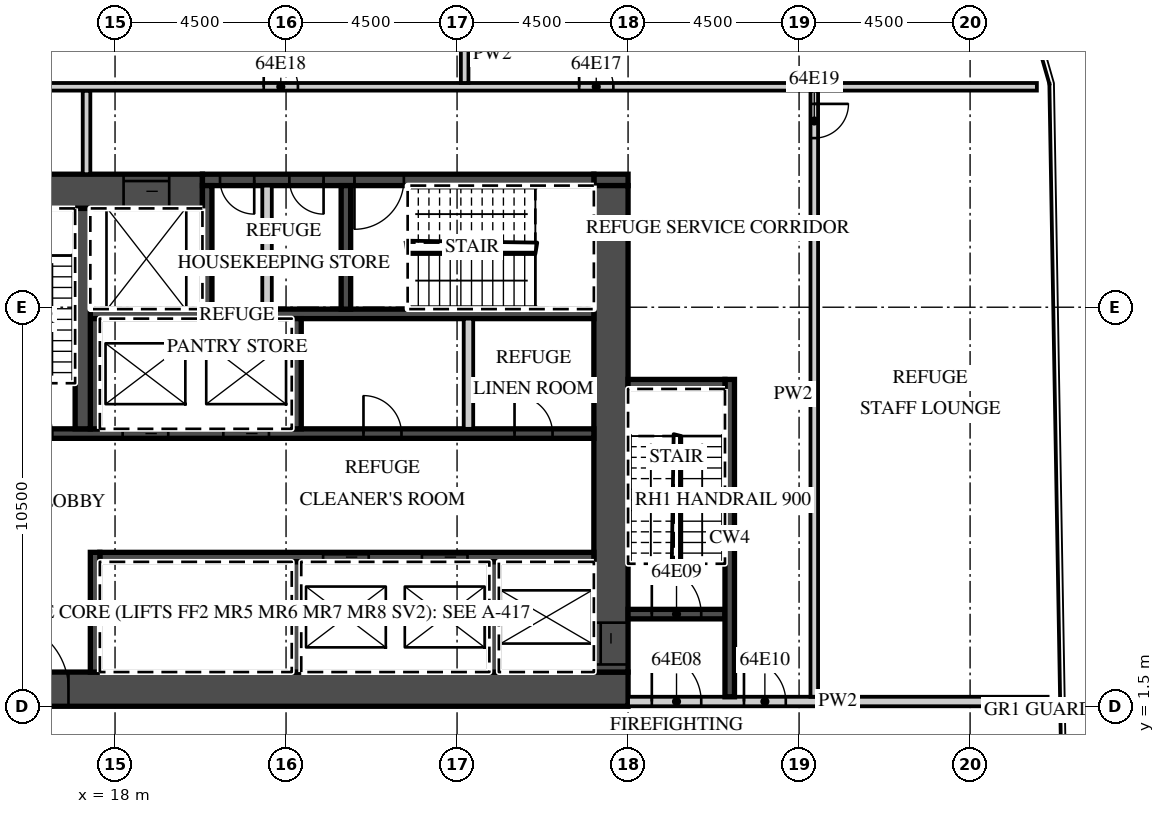
"""IFC4 building model, lengths in metres.
Left out: names, types, materials, properties, quantities, classifications, styles, units other than length and angle.
Written with IfcOpenShell. Run it as: python <this file> out.ifc"""

import sys

from ifc_helpers import new_model, si_unit, direction, frame, frame_2d, origin, place, context, subcontext, project, spatial, rectangle, extrude, element, fill, save


model = new_model("IFC4")
c1 = context("Model", 3, precision=1e-05, world=origin(), true_north=direction((0.0, 1.0)))
c2 = subcontext(c1, "Body", "Model", "MODEL_VIEW")
j1 = project(units=[si_unit("LENGTHUNIT", "METRE"), si_unit("PLANEANGLEUNIT", "RADIAN")], contexts=[c1])
p1 = place(None, origin())
s1 = spatial("IfcSite", under=j1, at=p1, CompositionType="ELEMENT")
p2 = place(p1, origin())
s2 = spatial("IfcBuilding", under=s1, at=p2, CompositionType="ELEMENT")
p3 = place(p2, frame((0.0, 0.0, 257.3)))
s3 = spatial("IfcBuildingStorey", under=s2, at=p3, CompositionType="ELEMENT", Elevation=257.3)
p4 = place(p3, frame((13.5, 1.95, 0.0), z_axis=(0.0, 0.0, 1.0), x_axis=(1.0, 0.0, 0.0)))
e1 = element("IfcWall", 1, at=p4, inside=s3, PredefinedType="SHEAR", context=c2, shape_type="SweptSolid", body=[
    extrude(rectangle(XDim=18.0, YDim=0.9, at=frame_2d((9.0, 0.0))), origin(), (0.0, 0.0, 1.0), 4.2),
])
p5 = place(p4, frame((1.475, 0.0, 0.0)))
e2 = element("IfcOpeningElement", 2, at=p5, cuts=e1, PredefinedType="OPENING", context=c2, shape_type="SweptSolid", body=[
    extrude(rectangle(XDim=1.8, YDim=2.1, at=frame_2d((0.9, 1.05))), frame((0.0, 0.46, 0.0), z_axis=(0.0, -1.0, 0.0), x_axis=(1.0, 0.0, 0.0)), (0.0, 0.0, 1.0), 0.92),
])
p6 = place(p3, frame((13.5, 15.05, 0.0), z_axis=(0.0, 0.0, 1.0), x_axis=(1.0, 0.0, 0.0)))
e3 = element("IfcWall", 3, at=p6, inside=s3, PredefinedType="SHEAR", context=c2, shape_type="SweptSolid", body=[
    extrude(rectangle(XDim=6.8, YDim=0.9, at=frame_2d((3.4, 0.0))), origin(), (0.0, 0.0, 1.0), 4.2),
])
p7 = place(p6, frame((4.725, 0.0, 0.0)))
e4 = element("IfcOpeningElement", 4, at=p7, cuts=e3, PredefinedType="OPENING", context=c2, shape_type="SweptSolid", body=[
    extrude(rectangle(XDim=1.2, YDim=2.1, at=frame_2d((0.6, 1.05))), frame((0.0, 0.46, 0.0), z_axis=(0.0, -1.0, 0.0), x_axis=(1.0, 0.0, 0.0)), (0.0, 0.0, 1.0), 0.92),
])
p8 = place(p3, frame((30.6, 15.35, 0.0), z_axis=(0.0, 0.0, 1.0), x_axis=(1.0, 0.0, 0.0)))
e5 = element("IfcWall", 5, at=p8, inside=s3, PredefinedType="SHEAR", context=c2, shape_type="SweptSolid", body=[
    extrude(rectangle(XDim=0.9, YDim=0.3, at=frame_2d((0.45, 0.0))), origin(), (0.0, 0.0, 1.0), 4.2),
])
p9 = place(p3, frame((20.3, 15.35, 0.0), z_axis=(0.0, 0.0, 1.0), x_axis=(1.0, 0.0, 0.0)))
e6 = element("IfcWall", 6, at=p9, inside=s3, PredefinedType="SHEAR", context=c2, shape_type="SweptSolid", body=[
    extrude(rectangle(XDim=10.3, YDim=0.3, at=frame_2d((5.15, 0.0))), origin(), (0.0, 0.0, 1.0), 4.2),
])
p10 = place(p9, frame((4.0, 0.0, 0.0)))
e7 = element("IfcOpeningElement", 7, at=p10, cuts=e6, PredefinedType="OPENING", context=c2, shape_type="SweptSolid", body=[
    extrude(rectangle(XDim=1.3, YDim=2.1, at=frame_2d((0.65, 1.05))), frame((0.0, 0.16, 0.0), z_axis=(0.0, -1.0, 0.0), x_axis=(1.0, 0.0, 0.0)), (0.0, 0.0, 1.0), 0.32),
])
p11 = place(p9, frame((2.288, 0.0, 0.0)))
e8 = element("IfcOpeningElement", 8, at=p11, cuts=e6, PredefinedType="OPENING", context=c2, shape_type="SweptSolid", body=[
    extrude(rectangle(XDim=0.9, YDim=2.1, at=frame_2d((0.45, 1.05))), frame((0.0, 0.16, 0.0), z_axis=(0.0, -1.0, 0.0), x_axis=(1.0, 0.0, 0.0)), (0.0, 0.0, 1.0), 0.32),
])
p12 = place(p9, frame((0.462, 0.0, 0.0)))
e9 = element("IfcOpeningElement", 9, at=p12, cuts=e6, PredefinedType="OPENING", context=c2, shape_type="SweptSolid", body=[
    extrude(rectangle(XDim=0.9, YDim=2.1, at=frame_2d((0.45, 1.05))), frame((0.0, 0.16, 0.0), z_axis=(0.0, -1.0, 0.0), x_axis=(1.0, 0.0, 0.0)), (0.0, 0.0, 1.0), 0.32),
])
p13 = place(p3, frame((31.05, 2.4, 0.0), z_axis=(0.0, 0.0, 1.0), x_axis=(0.0, 1.0, 0.0)))
e10 = element("IfcWall", 10, at=p13, inside=s3, PredefinedType="SHEAR", context=c2, shape_type="SweptSolid", body=[
    extrude(rectangle(XDim=12.8, YDim=0.9, at=frame_2d((6.4, 0.0))), origin(), (0.0, 0.0, 1.0), 4.2),
])
p14 = place(p13, frame((0.2, 0.0, 0.0)))
e11 = element("IfcOpeningElement", 11, at=p14, cuts=e10, PredefinedType="OPENING", context=c2, shape_type="SweptSolid", body=[
    extrude(rectangle(XDim=1.1, YDim=2.1, at=frame_2d((0.55, 1.05))), frame((0.0, 0.46, 0.0), z_axis=(0.0, -1.0, 0.0), x_axis=(1.0, 0.0, 0.0)), (0.0, 0.0, 1.0), 0.92),
])
p15 = place(p3, frame((17.6, 5.425, 0.0), z_axis=(0.0, 0.0, 1.0), x_axis=(1.0, 0.0, 0.0)))
e12 = element("IfcWall", 12, at=p15, inside=s3, PredefinedType="SHEAR", context=c2, shape_type="SweptSolid", body=[
    extrude(rectangle(XDim=13.0, YDim=0.25, at=frame_2d((6.5, 0.0))), origin(), (0.0, 0.0, 1.0), 4.2),
])
p16 = place(p15, frame((8.475, 0.0, 0.0)))
e13 = element("IfcOpeningElement", 13, at=p16, cuts=e12, PredefinedType="OPENING", context=c2, shape_type="SweptSolid", body=[
    extrude(rectangle(XDim=1.2, YDim=2.1, at=frame_2d((0.6, 1.05))), frame((0.0, 0.135, 0.0), z_axis=(0.0, -1.0, 0.0), x_axis=(1.0, 0.0, 0.0)), (0.0, 0.0, 1.0), 0.27),
])
p17 = place(p15, frame((5.875, 0.0, 0.0)))
e14 = element("IfcOpeningElement", 14, at=p17, cuts=e12, PredefinedType="OPENING", context=c2, shape_type="SweptSolid", body=[
    extrude(rectangle(XDim=1.2, YDim=2.1, at=frame_2d((0.6, 1.05))), frame((0.0, 0.135, 0.0), z_axis=(0.0, -1.0, 0.0), x_axis=(1.0, 0.0, 0.0)), (0.0, 0.0, 1.0), 0.27),
])
p18 = place(p3, frame((17.475, 2.4, 0.0), z_axis=(0.0, 0.0, 1.0), x_axis=(0.0, 1.0, 0.0)))
e15 = element("IfcWall", 15, at=p18, inside=s3, PredefinedType="SHEAR", context=c2, shape_type="SweptSolid", body=[
    extrude(rectangle(XDim=3.15, YDim=0.25, at=frame_2d((1.575, 0.0))), origin(), (0.0, 0.0, 1.0), 4.2),
])
for number, where, z_axis, x_axis in (
    (16, (27.975, 2.4, 0.0), (0.0, 0.0, 1.0), (0.0, 1.0, 0.0)),
    (17, (22.775, 2.4, 0.0), (0.0, 0.0, 1.0), (0.0, 1.0, 0.0)),
):
    element("IfcWall", number, at=place(p3, frame(where, z_axis=z_axis, x_axis=x_axis)), inside=s3, PredefinedType="SHEAR", context=c2, shape_type="SweptSolid", body=[
        extrude(rectangle(XDim=2.9, YDim=0.25, at=frame_2d((1.45, 0.0))), origin(), (0.0, 0.0, 1.0), 4.2),
    ])
p19 = place(p3, frame((14.4, 8.675, 0.0), z_axis=(0.0, 0.0, 1.0), x_axis=(1.0, 0.0, 0.0)))
e18 = element("IfcWall", 18, at=p19, inside=s3, PredefinedType="SHEAR", context=c2, shape_type="SweptSolid", body=[
    extrude(rectangle(XDim=16.2, YDim=0.25, at=frame_2d((8.1, 0.0))), origin(), (0.0, 0.0, 1.0), 4.2),
])
p20 = place(p19, frame((6.45, 0.0, 0.0)))
e19 = element("IfcOpeningElement", 19, at=p20, cuts=e18, PredefinedType="OPENING", context=c2, shape_type="SweptSolid", body=[
    extrude(rectangle(XDim=1.2, YDim=2.1, at=frame_2d((0.6, 1.05))), frame((0.0, 0.135, 0.0), z_axis=(0.0, -1.0, 0.0), x_axis=(1.0, 0.0, 0.0)), (0.0, 0.0, 1.0), 0.27),
])
p21 = place(p19, frame((3.8, 0.0, 0.0)))
e20 = element("IfcOpeningElement", 20, at=p21, cuts=e18, PredefinedType="OPENING", context=c2, shape_type="SweptSolid", body=[
    extrude(rectangle(XDim=1.2, YDim=2.1, at=frame_2d((0.6, 1.05))), frame((0.0, 0.135, 0.0), z_axis=(0.0, -1.0, 0.0), x_axis=(1.0, 0.0, 0.0)), (0.0, 0.0, 1.0), 0.27),
])
p22 = place(p19, frame((0.65, 0.0, 0.0)))
e21 = element("IfcOpeningElement", 21, at=p22, cuts=e18, PredefinedType="OPENING", context=c2, shape_type="SweptSolid", body=[
    extrude(rectangle(XDim=1.3, YDim=2.1, at=frame_2d((0.65, 1.05))), frame((0.0, 0.135, 0.0), z_axis=(0.0, -1.0, 0.0), x_axis=(1.0, 0.0, 0.0)), (0.0, 0.0, 1.0), 0.27),
])
p23 = place(p19, frame((14.113, 0.0, 0.0)))
e22 = element("IfcOpeningElement", 22, at=p23, cuts=e18, PredefinedType="OPENING", context=c2, shape_type="SweptSolid", body=[
    extrude(rectangle(XDim=1.0, YDim=2.1, at=frame_2d((0.5, 1.05))), frame((0.0, 0.135, 0.0), z_axis=(0.0, -1.0, 0.0), x_axis=(1.0, 0.0, 0.0)), (0.0, 0.0, 1.0), 0.27),
])
p24 = place(p19, frame((10.137, 0.0, 0.0)))
e23 = element("IfcOpeningElement", 23, at=p24, cuts=e18, PredefinedType="OPENING", context=c2, shape_type="SweptSolid", body=[
    extrude(rectangle(XDim=1.0, YDim=2.1, at=frame_2d((0.5, 1.05))), frame((0.0, 0.135, 0.0), z_axis=(0.0, -1.0, 0.0), x_axis=(1.0, 0.0, 0.0)), (0.0, 0.0, 1.0), 0.27),
])
p25 = place(p3, frame((17.35, 11.825, 0.0), z_axis=(0.0, 0.0, 1.0), x_axis=(1.0, 0.0, 0.0)))
e24 = element("IfcWall", 24, at=p25, inside=s3, PredefinedType="SHEAR", context=c2, shape_type="SweptSolid", body=[
    extrude(rectangle(XDim=13.25, YDim=0.25, at=frame_2d((6.625, 0.0))), origin(), (0.0, 0.0, 1.0), 4.2),
])
for number, where, z_axis, x_axis in (
    (25, (17.475, 8.8, 0.0), (0.0, 0.0, 1.0), (0.0, 1.0, 0.0)),
    (26, (22.775, 8.8, 0.0), (0.0, 0.0, 1.0), (0.0, 1.0, 0.0)),
):
    element("IfcWall", number, at=place(p3, frame(where, z_axis=z_axis, x_axis=x_axis)), inside=s3, PredefinedType="SHEAR", context=c2, shape_type="SweptSolid", body=[
        extrude(rectangle(XDim=2.9, YDim=0.25, at=frame_2d((1.45, 0.0))), origin(), (0.0, 0.0, 1.0), 4.2),
    ])
p26 = place(p3, frame((27.3, 8.8, 0.0), z_axis=(0.0, 0.0, 1.0), x_axis=(0.0, 1.0, 0.0)))
e27 = element("IfcWall", 27, at=p26, inside=s3, PredefinedType="PARTITIONING", context=c2, shape_type="SweptSolid", body=[
    extrude(rectangle(XDim=2.9, YDim=0.25, at=frame_2d((1.45, 0.0))), origin(), (0.0, 0.0, 1.0), 4.2),
])
p27 = place(p3, frame((17.15, 8.8, 0.0), z_axis=(0.0, 0.0, 1.0), x_axis=(0.0, 1.0, 0.0)))
e28 = element("IfcWall", 28, at=p27, inside=s3, PredefinedType="SHEAR", context=c2, shape_type="SweptSolid", body=[
    extrude(rectangle(XDim=5.8, YDim=0.4, at=frame_2d((2.9, 0.0))), origin(), (0.0, 0.0, 1.0), 4.2),
])
for number, where, z_axis, x_axis in (
    (29, (20.425, 11.95, 0.0), (0.0, 0.0, 1.0), (0.0, 1.0, 0.0)),
    (30, (24.075, 11.95, 0.0), (0.0, 0.0, 1.0), (0.0, 1.0, 0.0)),
):
    element("IfcWall", number, at=place(p3, frame(where, z_axis=z_axis, x_axis=x_axis)), inside=s3, PredefinedType="SHEAR", context=c2, shape_type="SweptSolid", body=[
        extrude(rectangle(XDim=3.25, YDim=0.25, at=frame_2d((1.625, 0.0))), origin(), (0.0, 0.0, 1.0), 4.2),
    ])
p28 = place(p3, frame((22.0, 11.95, 0.0), z_axis=(0.0, 0.0, 1.0), x_axis=(0.0, 1.0, 0.0)))
e31 = element("IfcWall", 31, at=p28, inside=s3, PredefinedType="PARTITIONING", context=c2, shape_type="SweptSolid", body=[
    extrude(rectangle(XDim=3.25, YDim=0.25, at=frame_2d((1.625, 0.0))), origin(), (0.0, 0.0, 1.0), 4.2),
])
p29 = place(p3, frame((31.5, 1.625, 0.0), z_axis=(0.0, 0.0, 1.0), x_axis=(1.0, 0.0, 0.0)))
e32 = element("IfcWall", 32, at=p29, inside=s3, PredefinedType="PARTITIONING", context=c2, shape_type="SweptSolid", body=[
    extrude(rectangle(XDim=11.04, YDim=0.25, at=frame_2d((5.52, 0.0))), origin(), (0.0, 0.0, 1.0), 4.2),
])
p30 = place(p29, frame((0.625, 0.0, 0.0)))
e33 = element("IfcOpeningElement", 33, at=p30, cuts=e32, PredefinedType="OPENING", context=c2, shape_type="SweptSolid", body=[
    extrude(rectangle(XDim=1.3, YDim=2.1, at=frame_2d((0.65, 1.05))), frame((0.0, 0.135, 0.0), z_axis=(0.0, -1.0, 0.0), x_axis=(1.0, 0.0, 0.0)), (0.0, 0.0, 1.0), 0.27),
])
p31 = place(p29, frame((3.05, 0.0, 0.0)))
e34 = element("IfcOpeningElement", 34, at=p31, cuts=e32, PredefinedType="OPENING", context=c2, shape_type="SweptSolid", body=[
    extrude(rectangle(XDim=1.1, YDim=2.1, at=frame_2d((0.55, 1.05))), frame((0.0, 0.135, 0.0), z_axis=(0.0, -1.0, 0.0), x_axis=(1.0, 0.0, 0.0)), (0.0, 0.0, 1.0), 0.27),
])
p32 = place(p3, frame((31.5, 3.925, 0.0), z_axis=(0.0, 0.0, 1.0), x_axis=(1.0, 0.0, 0.0)))
e35 = element("IfcWall", 35, at=p32, inside=s3, PredefinedType="SHEAR", context=c2, shape_type="SweptSolid", body=[
    extrude(rectangle(XDim=2.55, YDim=0.25, at=frame_2d((1.275, 0.0))), origin(), (0.0, 0.0, 1.0), 4.2),
])
p33 = place(p32, frame((0.625, 0.0, 0.0)))
e36 = element("IfcOpeningElement", 36, at=p33, cuts=e35, PredefinedType="OPENING", context=c2, shape_type="SweptSolid", body=[
    extrude(rectangle(XDim=1.3, YDim=2.1, at=frame_2d((0.65, 1.05))), frame((0.0, 0.135, 0.0), z_axis=(0.0, -1.0, 0.0), x_axis=(1.0, 0.0, 0.0)), (0.0, 0.0, 1.0), 0.27),
])
p34 = place(p3, frame((34.175, 1.75, 0.0), z_axis=(0.0, 0.0, 1.0), x_axis=(0.0, 1.0, 0.0)))
e37 = element("IfcWall", 37, at=p34, inside=s3, PredefinedType="SHEAR", context=c2, shape_type="SweptSolid", body=[
    extrude(rectangle(XDim=8.35, YDim=0.25, at=frame_2d((4.175, 0.0))), origin(), (0.0, 0.0, 1.0), 4.2),
])
p35 = place(p3, frame((31.5, 9.975, 0.0), z_axis=(0.0, 0.0, 1.0), x_axis=(1.0, 0.0, 0.0)))
e38 = element("IfcWall", 38, at=p35, inside=s3, PredefinedType="SHEAR", context=c2, shape_type="SweptSolid", body=[
    extrude(rectangle(XDim=2.55, YDim=0.25, at=frame_2d((1.275, 0.0))), origin(), (0.0, 0.0, 1.0), 4.2),
])
p36 = place(p3, frame((17.25, 15.5, 0.0), z_axis=(0.0, 0.0, 1.0), x_axis=(0.0, 1.0, 0.0)))
e39 = element("IfcWall", 39, at=p36, inside=s3, PredefinedType="PARTITIONING", context=c2, shape_type="SweptSolid", body=[
    extrude(rectangle(XDim=2.2, YDim=0.2, at=frame_2d((1.1, 0.0))), origin(), (0.0, 0.0, 1.0), 4.2),
])
p37 = place(p3, frame((36.4, 1.75, 0.0), z_axis=(0.0, 0.0, 1.0), x_axis=(0.0, 1.0, 0.0)))
e40 = element("IfcWall", 40, at=p37, inside=s3, PredefinedType="PARTITIONING", context=c2, shape_type="SweptSolid", body=[
    extrude(rectangle(XDim=15.95, YDim=0.2, at=frame_2d((7.975, 0.0))), origin(), (0.0, 0.0, 1.0), 4.2),
])
p38 = place(p37, frame((14.7, 0.0, 0.0)))
e41 = element("IfcOpeningElement", 41, at=p38, cuts=e40, PredefinedType="OPENING", context=c2, shape_type="SweptSolid", body=[
    extrude(rectangle(XDim=0.9, YDim=2.1, at=frame_2d((0.45, 1.05))), frame((0.0, 0.11, 0.0), z_axis=(0.0, -1.0, 0.0), x_axis=(1.0, 0.0, 0.0)), (0.0, 0.0, 1.0), 0.22),
])
p39 = place(p3, frame((13.6, 17.8, 0.0), z_axis=(0.0, 0.0, 1.0), x_axis=(1.0, 0.0, 0.0)))
e42 = element("IfcWall", 42, at=p39, inside=s3, PredefinedType="PARTITIONING", context=c2, shape_type="SweptSolid", body=[
    extrude(rectangle(XDim=28.657, YDim=0.2, at=frame_2d((14.329, 0.0))), origin(), (0.0, 0.0, 1.0), 4.2),
])
p40 = place(p39, frame((16.613, 0.0, 0.0)))
e43 = element("IfcOpeningElement", 43, at=p40, cuts=e42, PredefinedType="OPENING", context=c2, shape_type="SweptSolid", body=[
    extrude(rectangle(XDim=0.9, YDim=2.1, at=frame_2d((0.45, 1.05))), frame((0.0, 0.11, 0.0), z_axis=(0.0, -1.0, 0.0), x_axis=(1.0, 0.0, 0.0)), (0.0, 0.0, 1.0), 0.22),
])
p41 = place(p39, frame((8.312, 0.0, 0.0)))
e44 = element("IfcOpeningElement", 44, at=p41, cuts=e42, PredefinedType="OPENING", context=c2, shape_type="SweptSolid", body=[
    extrude(rectangle(XDim=0.9, YDim=2.1, at=frame_2d((0.45, 1.05))), frame((0.0, 0.11, 0.0), z_axis=(0.0, -1.0, 0.0), x_axis=(1.0, 0.0, 0.0)), (0.0, 0.0, 1.0), 0.22),
])
p42 = place(p3, frame((27.2, 17.9, 0.0), z_axis=(0.0, 0.0, 1.0), x_axis=(0.0, 1.0, 0.0)))
e45 = element("IfcWall", 45, at=p42, inside=s3, PredefinedType="PARTITIONING", context=c2, shape_type="SweptSolid", body=[
    extrude(rectangle(XDim=3.276, YDim=0.2, at=frame_2d((1.638, 0.0))), origin(), (0.0, 0.0, 1.0), 4.2),
])
p43 = place(p20, origin())
e46 = element("IfcDoor", 46, at=p43, inside=s3, OperationType="SLIDING_TO_LEFT", PredefinedType="DOOR", context=c2, shape_type="SweptSolid", body=[
    extrude(rectangle(XDim=1.2, YDim=2.1, at=frame_2d((0.6, 1.05))), frame((0.0, 0.025, 0.0), z_axis=(0.0, -1.0, 0.0), x_axis=(1.0, 0.0, 0.0)), (0.0, 0.0, 1.0), 0.05),
])
fill(e19, e46)
p44 = place(p21, origin())
e47 = element("IfcDoor", 47, at=p44, inside=s3, OperationType="SLIDING_TO_RIGHT", PredefinedType="DOOR", context=c2, shape_type="SweptSolid", body=[
    extrude(rectangle(XDim=1.2, YDim=2.1, at=frame_2d((0.6, 1.05))), frame((0.0, 0.025, 0.0), z_axis=(0.0, -1.0, 0.0), x_axis=(1.0, 0.0, 0.0)), (0.0, 0.0, 1.0), 0.05),
])
fill(e20, e47)
p45 = place(p16, origin())
e48 = element("IfcDoor", 48, at=p45, inside=s3, OperationType="SLIDING_TO_LEFT", PredefinedType="DOOR", context=c2, shape_type="SweptSolid", body=[
    extrude(rectangle(XDim=1.2, YDim=2.1, at=frame_2d((0.6, 1.05))), frame((0.0, 0.025, 0.0), z_axis=(0.0, -1.0, 0.0), x_axis=(1.0, 0.0, 0.0)), (0.0, 0.0, 1.0), 0.05),
])
fill(e13, e48)
p46 = place(p17, origin())
e49 = element("IfcDoor", 49, at=p46, inside=s3, OperationType="SLIDING_TO_RIGHT", PredefinedType="DOOR", context=c2, shape_type="SweptSolid", body=[
    extrude(rectangle(XDim=1.2, YDim=2.1, at=frame_2d((0.6, 1.05))), frame((0.0, 0.025, 0.0), z_axis=(0.0, -1.0, 0.0), x_axis=(1.0, 0.0, 0.0)), (0.0, 0.0, 1.0), 0.05),
])
fill(e14, e49)
p47 = place(p7, origin())
e50 = element("IfcDoor", 50, at=p47, inside=s3, OperationType="SLIDING_TO_LEFT", PredefinedType="DOOR", context=c2, shape_type="SweptSolid", body=[
    extrude(rectangle(XDim=1.2, YDim=2.1, at=frame_2d((0.6, 1.05))), frame((0.0, 0.025, 0.0), z_axis=(0.0, -1.0, 0.0), x_axis=(1.0, 0.0, 0.0)), (0.0, 0.0, 1.0), 0.05),
])
fill(e4, e50)
p48 = place(p14, origin())
e51 = element("IfcDoor", 51, at=p48, inside=s3, OperationType="SLIDING_TO_LEFT", PredefinedType="DOOR", context=c2, shape_type="SweptSolid", body=[
    extrude(rectangle(XDim=1.1, YDim=2.1, at=frame_2d((0.55, 1.05))), frame((0.0, 0.025, 0.0), z_axis=(0.0, -1.0, 0.0), x_axis=(1.0, 0.0, 0.0)), (0.0, 0.0, 1.0), 0.05),
])
fill(e11, e51)
p49 = place(p5, origin())
e52 = element("IfcDoor", 52, at=p49, inside=s3, OperationType="DOUBLE_DOOR_DOUBLE_SWING", PredefinedType="DOOR", context=c2, shape_type="SweptSolid", body=[
    extrude(rectangle(XDim=1.8, YDim=2.1, at=frame_2d((0.9, 1.05))), frame((0.0, 0.025, 0.0), z_axis=(0.0, -1.0, 0.0), x_axis=(1.0, 0.0, 0.0)), (0.0, 0.0, 1.0), 0.05),
])
fill(e2, e52)
p50 = place(p30, origin())
e53 = element("IfcDoor", 53, at=p50, inside=s3, OperationType="SINGLE_SWING_LEFT", PredefinedType="DOOR", context=c2, shape_type="SweptSolid", body=[
    extrude(rectangle(XDim=1.3, YDim=2.1, at=frame_2d((0.65, 1.05))), frame((0.0, 0.025, 0.0), z_axis=(0.0, -1.0, 0.0), x_axis=(1.0, 0.0, 0.0)), (0.0, 0.0, 1.0), 0.05),
])
fill(e33, e53)
p51 = place(p33, origin())
e54 = element("IfcDoor", 54, at=p51, inside=s3, OperationType="SINGLE_SWING_LEFT", PredefinedType="DOOR", context=c2, shape_type="SweptSolid", body=[
    extrude(rectangle(XDim=1.3, YDim=2.1, at=frame_2d((0.65, 1.05))), frame((0.0, 0.025, 0.0), z_axis=(0.0, -1.0, 0.0), x_axis=(1.0, 0.0, 0.0)), (0.0, 0.0, 1.0), 0.05),
])
fill(e36, e54)
p52 = place(p31, origin())
e55 = element("IfcDoor", 55, at=p52, inside=s3, OperationType="SINGLE_SWING_LEFT", PredefinedType="DOOR", context=c2, shape_type="SweptSolid", body=[
    extrude(rectangle(XDim=1.1, YDim=2.1, at=frame_2d((0.55, 1.05))), frame((0.0, 0.025, 0.0), z_axis=(0.0, -1.0, 0.0), x_axis=(1.0, 0.0, 0.0)), (0.0, 0.0, 1.0), 0.05),
])
fill(e34, e55)
p53 = place(p10, origin())
e56 = element("IfcDoor", 56, at=p53, inside=s3, OperationType="SINGLE_SWING_LEFT", PredefinedType="DOOR", context=c2, shape_type="SweptSolid", body=[
    extrude(rectangle(XDim=1.3, YDim=2.1, at=frame_2d((0.65, 1.05))), frame((0.0, 0.025, 0.0), z_axis=(0.0, -1.0, 0.0), x_axis=(1.0, 0.0, 0.0)), (0.0, 0.0, 1.0), 0.05),
])
fill(e7, e56)
p54 = place(p11, origin())
e57 = element("IfcDoor", 57, at=p54, inside=s3, OperationType="SINGLE_SWING_RIGHT", PredefinedType="DOOR", context=c2, shape_type="SweptSolid", body=[
    extrude(rectangle(XDim=0.9, YDim=2.1, at=frame_2d((0.45, 1.05))), frame((0.0, 0.025, 0.0), z_axis=(0.0, -1.0, 0.0), x_axis=(1.0, 0.0, 0.0)), (0.0, 0.0, 1.0), 0.05),
])
fill(e8, e57)
p55 = place(p12, origin())
e58 = element("IfcDoor", 58, at=p55, inside=s3, OperationType="SINGLE_SWING_RIGHT", PredefinedType="DOOR", context=c2, shape_type="SweptSolid", body=[
    extrude(rectangle(XDim=0.9, YDim=2.1, at=frame_2d((0.45, 1.05))), frame((0.0, 0.025, 0.0), z_axis=(0.0, -1.0, 0.0), x_axis=(1.0, 0.0, 0.0)), (0.0, 0.0, 1.0), 0.05),
])
fill(e9, e58)
p56 = place(p23, origin())
e59 = element("IfcDoor", 59, at=p56, inside=s3, OperationType="SINGLE_SWING_LEFT", PredefinedType="DOOR", context=c2, shape_type="SweptSolid", body=[
    extrude(rectangle(XDim=1.0, YDim=2.1, at=frame_2d((0.5, 1.05))), frame((0.0, 0.025, 0.0), z_axis=(0.0, -1.0, 0.0), x_axis=(1.0, 0.0, 0.0)), (0.0, 0.0, 1.0), 0.05),
])
fill(e22, e59)
p57 = place(p24, origin())
e60 = element("IfcDoor", 60, at=p57, inside=s3, OperationType="SINGLE_SWING_LEFT", PredefinedType="DOOR", context=c2, shape_type="SweptSolid", body=[
    extrude(rectangle(XDim=1.0, YDim=2.1, at=frame_2d((0.5, 1.05))), frame((0.0, 0.025, 0.0), z_axis=(0.0, -1.0, 0.0), x_axis=(1.0, 0.0, 0.0)), (0.0, 0.0, 1.0), 0.05),
])
fill(e23, e60)
p58 = place(p40, origin())
e61 = element("IfcDoor", 61, at=p58, inside=s3, OperationType="SINGLE_SWING_LEFT", PredefinedType="DOOR", context=c2, shape_type="SweptSolid", body=[
    extrude(rectangle(XDim=0.9, YDim=2.1, at=frame_2d((0.45, 1.05))), frame((0.0, 0.025, 0.0), z_axis=(0.0, -1.0, 0.0), x_axis=(1.0, 0.0, 0.0)), (0.0, 0.0, 1.0), 0.05),
])
fill(e43, e61)
p59 = place(p41, origin())
e62 = element("IfcDoor", 62, at=p59, inside=s3, OperationType="SINGLE_SWING_LEFT", PredefinedType="DOOR", context=c2, shape_type="SweptSolid", body=[
    extrude(rectangle(XDim=0.9, YDim=2.1, at=frame_2d((0.45, 1.05))), frame((0.0, 0.025, 0.0), z_axis=(0.0, -1.0, 0.0), x_axis=(1.0, 0.0, 0.0)), (0.0, 0.0, 1.0), 0.05),
])
fill(e44, e62)
p60 = place(p38, origin())
e63 = element("IfcDoor", 63, at=p60, inside=s3, OperationType="SINGLE_SWING_RIGHT", PredefinedType="DOOR", context=c2, shape_type="SweptSolid", body=[
    extrude(rectangle(XDim=0.9, YDim=2.1, at=frame_2d((0.45, 1.05))), frame((0.0, 0.025, 0.0), z_axis=(0.0, -1.0, 0.0), x_axis=(1.0, 0.0, 0.0)), (0.0, 0.0, 1.0), 0.05),
])
fill(e41, e63)
save(model, sys.argv[1])
